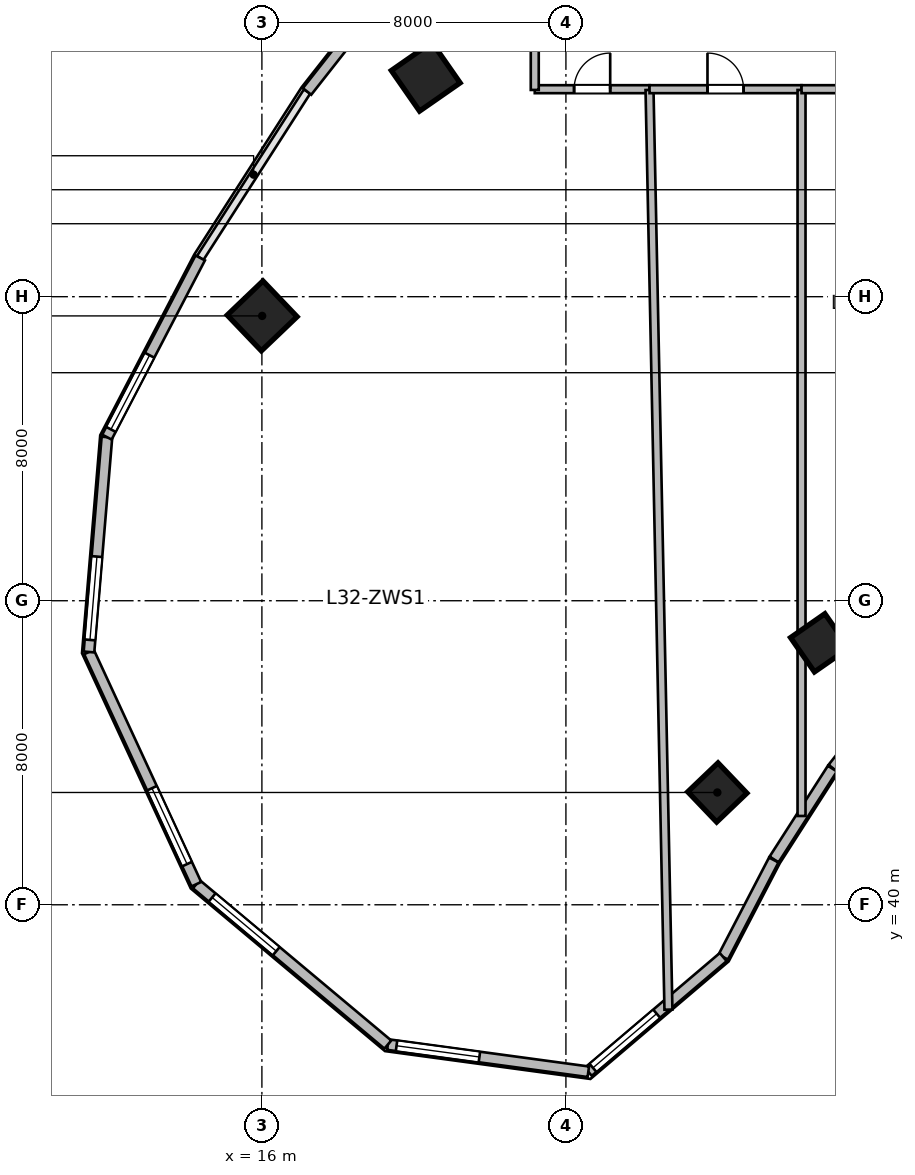
"""IFC4 building model, lengths in metres.
Left out: names, types, materials, properties, quantities, classifications, styles, units other than length and angle.
Written with IfcOpenShell. Run it as: python <this file> out.ifc"""

import sys

from ifc_helpers import new_model, si_unit, direction, frame, frame_2d, origin, origin_2d, place, context, subcontext, project, spatial, rectangle, extrude, source, transform, mapped, element, fill, save


model = new_model("IFC4")
c1 = context("Model", 3, precision=1e-05, world=origin(), true_north=direction((0.0, 1.0)))
c2 = subcontext(c1, "Body", "Model", "MODEL_VIEW")
j1 = project(units=[si_unit("LENGTHUNIT", "METRE"), si_unit("PLANEANGLEUNIT", "RADIAN")], contexts=[c1])
p1 = place(None, origin())
s1 = spatial("IfcSite", under=j1, at=p1, CompositionType="ELEMENT")
p2 = place(p1, origin())
s2 = spatial("IfcBuilding", under=s1, at=p2, CompositionType="ELEMENT")
p3 = place(p2, frame((0.0, 0.0, 135.0)))
s3 = spatial("IfcBuildingStorey", under=s2, at=p3, CompositionType="ELEMENT", Elevation=135.0)
m1 = source(origin(), c2, "Body", "SweptSolid", [
    extrude(rectangle(XDim=1.1, YDim=1.1, at=origin_2d()), origin(), (0.0, 0.0, 1.0), 3.9),
])
p4 = place(p3, frame((27.985, 42.955, 0.0), z_axis=(0.0, 0.0, 1.0), x_axis=(-0.690756218984, 0.723087716626, 0.0)))
e1 = element("IfcColumn", 1, at=p4, inside=s3, PredefinedType="COLUMN", context=c2, shape_type="MappedRepresentation", body=[
    mapped(m1, transform((0.0, 0.0, 0.0), scale=1.0)),
])
m2 = source(origin(), c2, "Body", "SweptSolid", [
    extrude(rectangle(XDim=1.3, YDim=1.3, at=origin_2d()), origin(), (0.0, 0.0, 1.0), 3.9),
])
p5 = place(p3, frame((16.007, 55.494, 0.0), z_axis=(0.0, 0.0, 1.0), x_axis=(-0.690756218984, 0.723087716626, 0.0)))
e2 = element("IfcColumn", 2, at=p5, inside=s3, PredefinedType="COLUMN", context=c2, shape_type="MappedRepresentation", body=[
    mapped(m2, transform((0.0, 0.0, 0.0), scale=1.0)),
])
p6 = place(p3, frame((30.677, 46.892, 0.0), z_axis=(0.0, 0.0, 1.0), x_axis=(-0.571143442153, 0.820850271661, 0.0)))
e3 = element("IfcColumn", 3, at=p6, inside=s3, PredefinedType="COLUMN", context=c2, shape_type="MappedRepresentation", body=[
    mapped(m1, transform((0.0, 0.0, 0.0), scale=1.0)),
])
p7 = place(p3, frame((20.311, 61.789, 0.0), z_axis=(0.0, 0.0, 1.0), x_axis=(-0.571143442153, 0.820850271661, 0.0)))
e4 = element("IfcColumn", 4, at=p7, inside=s3, PredefinedType="COLUMN", context=c2, shape_type="MappedRepresentation", body=[
    mapped(m2, transform((0.0, 0.0, 0.0), scale=1.0)),
])
m3 = source(origin(), c2, "Body", "SweptSolid", [
    extrude(rectangle(XDim=2.76, YDim=0.28, at=frame_2d((1.38, 0.0))), origin(), (0.0, 0.0, 1.0), 3.65),
])
p8 = place(p3, frame((32.728, 45.766, 0.0), z_axis=(0.0, 0.0, 1.0), x_axis=(-0.618180818641, -0.786035925047, 0.0)))
e5 = element("IfcWall", 5, at=p8, inside=s3, PredefinedType="SOLIDWALL", context=c2, shape_type="MappedRepresentation", body=[
    mapped(m3, transform((0.0, 0.0, 0.0), scale=1.0)),
])
m4 = source(origin(), c2, "Body", "SweptSolid", [
    extrude(rectangle(XDim=2.84, YDim=0.28, at=frame_2d((1.42, 0.0))), origin(), (0.0, 0.0, 1.0), 3.65),
])
p9 = place(p3, frame((31.011, 43.582, 0.0), z_axis=(0.0, 0.0, 1.0), x_axis=(-0.540214368057, -0.841527442538, 0.0)))
e6 = element("IfcWall", 6, at=p9, inside=s3, PredefinedType="SOLIDWALL", context=c2, shape_type="MappedRepresentation", body=[
    mapped(m4, transform((0.0, 0.0, 0.0), scale=1.0)),
])
m5 = source(origin(), c2, "Body", "SweptSolid", [
    extrude(rectangle(XDim=2.88, YDim=0.28, at=frame_2d((1.44, 0.0))), origin(), (0.0, 0.0, 1.0), 3.65),
])
p10 = place(p3, frame((29.469, 41.178, 0.0), z_axis=(0.0, 0.0, 1.0), x_axis=(-0.461769086658, -0.887000175088, 0.0)))
e7 = element("IfcWall", 7, at=p10, inside=s3, PredefinedType="SOLIDWALL", context=c2, shape_type="MappedRepresentation", body=[
    mapped(m5, transform((0.0, 0.0, 0.0), scale=1.0)),
])
m6 = source(origin(), c2, "Body", "SweptSolid", [
    extrude(rectangle(XDim=4.659, YDim=0.28, at=frame_2d((2.33, 0.0))), origin(), (0.0, 0.0, 1.0), 3.65),
])
p11 = place(p3, frame((28.139, 38.624, 0.0), z_axis=(0.0, 0.0, 1.0), x_axis=(-0.761913458795, -0.647678841176, 0.0)))
e8 = element("IfcWall", 8, at=p11, inside=s3, PredefinedType="SOLIDWALL", context=c2, shape_type="MappedRepresentation", body=[
    mapped(m6, transform((0.0, 0.0, 0.0), scale=1.0)),
])
p12 = place(p11, frame((2.299, 0.0, 0.95)))
e9 = element("IfcOpeningElement", 9, at=p12, cuts=e8, PredefinedType="OPENING", context=c2, shape_type="SweptSolid", body=[
    extrude(rectangle(XDim=2.2, YDim=2.1, at=frame_2d((1.1, 1.05))), frame((0.0, 0.15, 0.0), z_axis=(0.0, -1.0, 0.0), x_axis=(1.0, 0.0, 0.0)), (0.0, 0.0, 1.0), 0.3),
])
m7 = source(origin(), c2, "Body", "SweptSolid", [
    extrude(rectangle(XDim=5.324, YDim=0.28, at=frame_2d((2.662, 0.0))), origin(), (0.0, 0.0, 1.0), 3.65),
])
p13 = place(p3, frame((24.59, 35.606, 0.0), z_axis=(0.0, 0.0, 1.0), x_axis=(-0.990931467223, 0.134368252451, 0.0)))
e10 = element("IfcWall", 10, at=p13, inside=s3, PredefinedType="SOLIDWALL", context=c2, shape_type="MappedRepresentation", body=[
    mapped(m7, transform((0.0, 0.0, 0.0), scale=1.0)),
])
p14 = place(p13, frame((2.893, 0.0, 0.95)))
e11 = element("IfcOpeningElement", 11, at=p14, cuts=e10, PredefinedType="OPENING", context=c2, shape_type="SweptSolid", body=[
    extrude(rectangle(XDim=2.2, YDim=2.1, at=frame_2d((1.1, 1.05))), frame((0.0, 0.15, 0.0), z_axis=(0.0, -1.0, 0.0), x_axis=(1.0, 0.0, 0.0)), (0.0, 0.0, 1.0), 0.3),
])
m8 = source(origin(), c2, "Body", "SweptSolid", [
    extrude(rectangle(XDim=6.573, YDim=0.28, at=frame_2d((3.287, 0.0))), origin(), (0.0, 0.0, 1.0), 3.65),
])
p15 = place(p3, frame((19.314, 36.322, 0.0), z_axis=(0.0, 0.0, 1.0), x_axis=(-0.766715154163, 0.641987439423, 0.0)))
e12 = element("IfcWall", 12, at=p15, inside=s3, PredefinedType="SOLIDWALL", context=c2, shape_type="MappedRepresentation", body=[
    mapped(m8, transform((0.0, 0.0, 0.0), scale=1.0)),
])
p16 = place(p15, frame((3.83, 0.0, 0.95)))
e13 = element("IfcOpeningElement", 13, at=p16, cuts=e12, PredefinedType="OPENING", context=c2, shape_type="SweptSolid", body=[
    extrude(rectangle(XDim=2.2, YDim=2.1, at=frame_2d((1.1, 1.05))), frame((0.0, 0.15, 0.0), z_axis=(0.0, -1.0, 0.0), x_axis=(1.0, 0.0, 0.0)), (0.0, 0.0, 1.0), 0.3),
])
m9 = source(origin(), c2, "Body", "SweptSolid", [
    extrude(rectangle(XDim=6.732, YDim=0.28, at=frame_2d((3.366, 0.0))), origin(), (0.0, 0.0, 1.0), 3.65),
])
p17 = place(p3, frame((14.275, 40.541, 0.0), z_axis=(0.0, 0.0, 1.0), x_axis=(-0.419644552709, 0.907688520023, 0.0)))
e14 = element("IfcWall", 14, at=p17, inside=s3, PredefinedType="SOLIDWALL", context=c2, shape_type="MappedRepresentation", body=[
    mapped(m9, transform((0.0, 0.0, 0.0), scale=1.0)),
])
p18 = place(p17, frame((0.583, 0.0, 0.95)))
e15 = element("IfcOpeningElement", 15, at=p18, cuts=e14, PredefinedType="OPENING", context=c2, shape_type="SweptSolid", body=[
    extrude(rectangle(XDim=2.2, YDim=2.1, at=frame_2d((1.1, 1.05))), frame((0.0, 0.15, 0.0), z_axis=(0.0, -1.0, 0.0), x_axis=(1.0, 0.0, 0.0)), (0.0, 0.0, 1.0), 0.3),
])
m10 = source(origin(), c2, "Body", "SweptSolid", [
    extrude(rectangle(XDim=5.674, YDim=0.28, at=frame_2d((2.837, 0.0))), origin(), (0.0, 0.0, 1.0), 3.65),
])
p19 = place(p3, frame((11.45, 46.652, 0.0), z_axis=(0.0, 0.0, 1.0), x_axis=(0.083309007867, 0.996523762491, 0.0)))
e16 = element("IfcWall", 16, at=p19, inside=s3, PredefinedType="SOLIDWALL", context=c2, shape_type="MappedRepresentation", body=[
    mapped(m10, transform((0.0, 0.0, 0.0), scale=1.0)),
])
p20 = place(p19, frame((0.318, 0.0, 0.95)))
e17 = element("IfcOpeningElement", 17, at=p20, cuts=e16, PredefinedType="OPENING", context=c2, shape_type="SweptSolid", body=[
    extrude(rectangle(XDim=2.2, YDim=2.1, at=frame_2d((1.1, 1.05))), frame((0.0, 0.15, 0.0), z_axis=(0.0, -1.0, 0.0), x_axis=(1.0, 0.0, 0.0)), (0.0, 0.0, 1.0), 0.3),
])
m11 = source(origin(), c2, "Body", "SweptSolid", [
    extrude(rectangle(XDim=5.315, YDim=0.28, at=frame_2d((2.658, 0.0))), origin(), (0.0, 0.0, 1.0), 3.65),
])
p21 = place(p3, frame((11.922, 52.305, 0.0), z_axis=(0.0, 0.0, 1.0), x_axis=(0.461760527822, 0.887004630735, 0.0)))
e18 = element("IfcWall", 18, at=p21, inside=s3, PredefinedType="SOLIDWALL", context=c2, shape_type="MappedRepresentation", body=[
    mapped(m11, transform((0.0, 0.0, 0.0), scale=1.0)),
])
p22 = place(p21, frame((0.229, 0.0, 0.95)))
e19 = element("IfcOpeningElement", 19, at=p22, cuts=e18, PredefinedType="OPENING", context=c2, shape_type="SweptSolid", body=[
    extrude(rectangle(XDim=2.2, YDim=2.1, at=frame_2d((1.1, 1.05))), frame((0.0, 0.15, 0.0), z_axis=(0.0, -1.0, 0.0), x_axis=(1.0, 0.0, 0.0)), (0.0, 0.0, 1.0), 0.3),
])
m12 = source(origin(), c2, "Body", "SweptSolid", [
    extrude(rectangle(XDim=5.058, YDim=0.28, at=frame_2d((2.529, 0.0))), origin(), (0.0, 0.0, 1.0), 3.65),
])
p23 = place(p3, frame((17.188, 61.4, 0.0), z_axis=(0.0, 0.0, 1.0), x_axis=(0.618145507434, 0.786063694391, 0.0)))
e20 = element("IfcWall", 20, at=p23, inside=s3, PredefinedType="SOLIDWALL", context=c2, shape_type="MappedRepresentation", body=[
    mapped(m12, transform((0.0, 0.0, 0.0), scale=1.0)),
])
m13 = source(origin(), c2, "Body", "SweptSolid", [
    extrude(rectangle(XDim=3.02, YDim=0.21, at=frame_2d((1.51, 0.0))), origin(), (0.0, 0.0, 1.0), 3.65),
])
p24 = place(p3, frame((23.18, 61.46, 0.0), z_axis=(0.0, 0.0, 1.0), x_axis=(1.0, 0.0, 0.0)))
e21 = element("IfcWall", 21, at=p24, inside=s3, PredefinedType="PARTITIONING", context=c2, shape_type="MappedRepresentation", body=[
    mapped(m13, transform((0.0, 0.0, 0.0), scale=1.0)),
])
p25 = place(p24, frame((1.035, 0.0, 0.0)))
e22 = element("IfcOpeningElement", 22, at=p25, cuts=e21, PredefinedType="OPENING", context=c2, shape_type="SweptSolid", body=[
    extrude(rectangle(XDim=0.95, YDim=2.1, at=frame_2d((0.475, 1.05))), frame((0.0, 0.115, 0.0), z_axis=(0.0, -1.0, 0.0), x_axis=(1.0, 0.0, 0.0)), (0.0, 0.0, 1.0), 0.23),
])
m14 = source(origin(), c2, "Body", "SweptSolid", [
    extrude(rectangle(XDim=24.204, YDim=0.21, at=frame_2d((12.102, 0.0))), origin(), (0.0, 0.0, 1.0), 2.942),
])
p26 = place(p3, frame((26.698, 37.241, 0.0), z_axis=(0.0, 0.0, 1.0), x_axis=(-0.020566881318, 0.999788479326, 0.0)))
e23 = element("IfcWall", 23, at=p26, inside=s3, PredefinedType="PARTITIONING", context=c2, shape_type="MappedRepresentation", body=[
    mapped(m14, transform((0.0, 0.0, 0.0), scale=1.0)),
])
m15 = source(origin(), c2, "Body", "SweptSolid", [
    extrude(rectangle(XDim=4.0, YDim=0.21, at=frame_2d((2.0, 0.0))), origin(), (0.0, 0.0, 1.0), 3.65),
])
p27 = place(p3, frame((26.2, 61.46, 0.0), z_axis=(0.0, 0.0, 1.0), x_axis=(1.0, 0.0, 0.0)))
e24 = element("IfcWall", 24, at=p27, inside=s3, PredefinedType="PARTITIONING", context=c2, shape_type="MappedRepresentation", body=[
    mapped(m15, transform((0.0, 0.0, 0.0), scale=1.0)),
])
p28 = place(p27, frame((1.525, 0.0, 0.0)))
e25 = element("IfcOpeningElement", 25, at=p28, cuts=e24, PredefinedType="OPENING", context=c2, shape_type="SweptSolid", body=[
    extrude(rectangle(XDim=0.95, YDim=2.1, at=frame_2d((0.475, 1.05))), frame((0.0, 0.115, 0.0), z_axis=(0.0, -1.0, 0.0), x_axis=(1.0, 0.0, 0.0)), (0.0, 0.0, 1.0), 0.23),
])
m16 = source(origin(), c2, "Body", "SweptSolid", [
    extrude(rectangle(XDim=19.103, YDim=0.21, at=frame_2d((9.552, 0.0))), origin(), (0.0, 0.0, 1.0), 2.942),
])
p29 = place(p3, frame((30.2, 42.337, 0.0), z_axis=(0.0, 0.0, 1.0), x_axis=(0.0, 1.0, 0.0)))
e26 = element("IfcWall", 26, at=p29, inside=s3, PredefinedType="PARTITIONING", context=c2, shape_type="MappedRepresentation", body=[
    mapped(m16, transform((0.0, 0.0, 0.0), scale=1.0)),
])
m17 = source(origin(), c2, "Body", "SweptSolid", [
    extrude(rectangle(XDim=4.2, YDim=0.21, at=frame_2d((2.1, 0.0))), origin(), (0.0, 0.0, 1.0), 3.65),
])
p30 = place(p3, frame((30.2, 61.46, 0.0), z_axis=(0.0, 0.0, 1.0), x_axis=(1.0, 0.0, 0.0)))
e27 = element("IfcWall", 27, at=p30, inside=s3, PredefinedType="PARTITIONING", context=c2, shape_type="MappedRepresentation", body=[
    mapped(m17, transform((0.0, 0.0, 0.0), scale=1.0)),
])
p31 = place(p30, frame((1.625, 0.0, 0.0)))
e28 = element("IfcOpeningElement", 28, at=p31, cuts=e27, PredefinedType="OPENING", context=c2, shape_type="SweptSolid", body=[
    extrude(rectangle(XDim=0.95, YDim=2.1, at=frame_2d((0.475, 1.05))), frame((0.0, 0.115, 0.0), z_axis=(0.0, -1.0, 0.0), x_axis=(1.0, 0.0, 0.0)), (0.0, 0.0, 1.0), 0.23),
])
m18 = source(origin(), c2, "Body", "SweptSolid", [
    extrude(rectangle(XDim=2.62, YDim=0.21, at=frame_2d((1.31, 0.0))), origin(), (0.0, 0.0, 1.0), 3.65),
])
p32 = place(p3, frame((23.18, 61.44, 0.0), z_axis=(0.0, 0.0, 1.0), x_axis=(0.0, 1.0, 0.0)))
e29 = element("IfcWall", 29, at=p32, inside=s3, PredefinedType="PARTITIONING", context=c2, shape_type="MappedRepresentation", body=[
    mapped(m18, transform((0.0, 0.0, 0.0), scale=1.0)),
])
m19 = source(origin(), c2, "Body", "SweptSolid", [
    extrude(rectangle(XDim=2.2, YDim=2.1, at=frame_2d((1.1, 1.05))), frame((0.0, 0.03, 0.0), z_axis=(0.0, -1.0, 0.0), x_axis=(1.0, 0.0, 0.0)), (0.0, 0.0, 1.0), 0.06),
])
p33 = place(p12, origin())
e30 = element("IfcWindow", 30, at=p33, inside=s3, PartitioningType="TRIPLE_PANEL_VERTICAL", PredefinedType="WINDOW", context=c2, shape_type="MappedRepresentation", body=[
    mapped(m19, transform((0.0, 0.0, 0.0), scale=1.0)),
])
fill(e9, e30)
p34 = place(p14, origin())
e31 = element("IfcWindow", 31, at=p34, inside=s3, PartitioningType="TRIPLE_PANEL_VERTICAL", PredefinedType="WINDOW", context=c2, shape_type="MappedRepresentation", body=[
    mapped(m19, transform((0.0, 0.0, 0.0), scale=1.0)),
])
fill(e11, e31)
p35 = place(p16, origin())
e32 = element("IfcWindow", 32, at=p35, inside=s3, PartitioningType="TRIPLE_PANEL_VERTICAL", PredefinedType="WINDOW", context=c2, shape_type="MappedRepresentation", body=[
    mapped(m19, transform((0.0, 0.0, 0.0), scale=1.0)),
])
fill(e13, e32)
p36 = place(p18, origin())
e33 = element("IfcWindow", 33, at=p36, inside=s3, PartitioningType="TRIPLE_PANEL_VERTICAL", PredefinedType="WINDOW", context=c2, shape_type="MappedRepresentation", body=[
    mapped(m19, transform((0.0, 0.0, 0.0), scale=1.0)),
])
fill(e15, e33)
p37 = place(p20, origin())
e34 = element("IfcWindow", 34, at=p37, inside=s3, PartitioningType="TRIPLE_PANEL_VERTICAL", PredefinedType="WINDOW", context=c2, shape_type="MappedRepresentation", body=[
    mapped(m19, transform((0.0, 0.0, 0.0), scale=1.0)),
])
fill(e17, e34)
p38 = place(p22, origin())
e35 = element("IfcWindow", 35, at=p38, inside=s3, PartitioningType="TRIPLE_PANEL_VERTICAL", PredefinedType="WINDOW", context=c2, shape_type="MappedRepresentation", body=[
    mapped(m19, transform((0.0, 0.0, 0.0), scale=1.0)),
])
fill(e19, e35)
m20 = source(origin(), c2, "Body", "SweptSolid", [
    extrude(rectangle(XDim=0.95, YDim=2.1, at=frame_2d((0.475, 1.05))), frame((0.0, 0.025, 0.0), z_axis=(0.0, -1.0, 0.0), x_axis=(1.0, 0.0, 0.0)), (0.0, 0.0, 1.0), 0.05),
])
p39 = place(p25, origin())
e36 = element("IfcDoor", 36, at=p39, inside=s3, OperationType="SINGLE_SWING_RIGHT", PredefinedType="DOOR", context=c2, shape_type="MappedRepresentation", body=[
    mapped(m20, transform((0.0, 0.0, 0.0), scale=1.0)),
])
fill(e22, e36)
p40 = place(p28, origin())
e37 = element("IfcDoor", 37, at=p40, inside=s3, OperationType="SINGLE_SWING_LEFT", PredefinedType="DOOR", context=c2, shape_type="MappedRepresentation", body=[
    mapped(m20, transform((0.0, 0.0, 0.0), scale=1.0)),
])
fill(e25, e37)
save(model, sys.argv[1])
